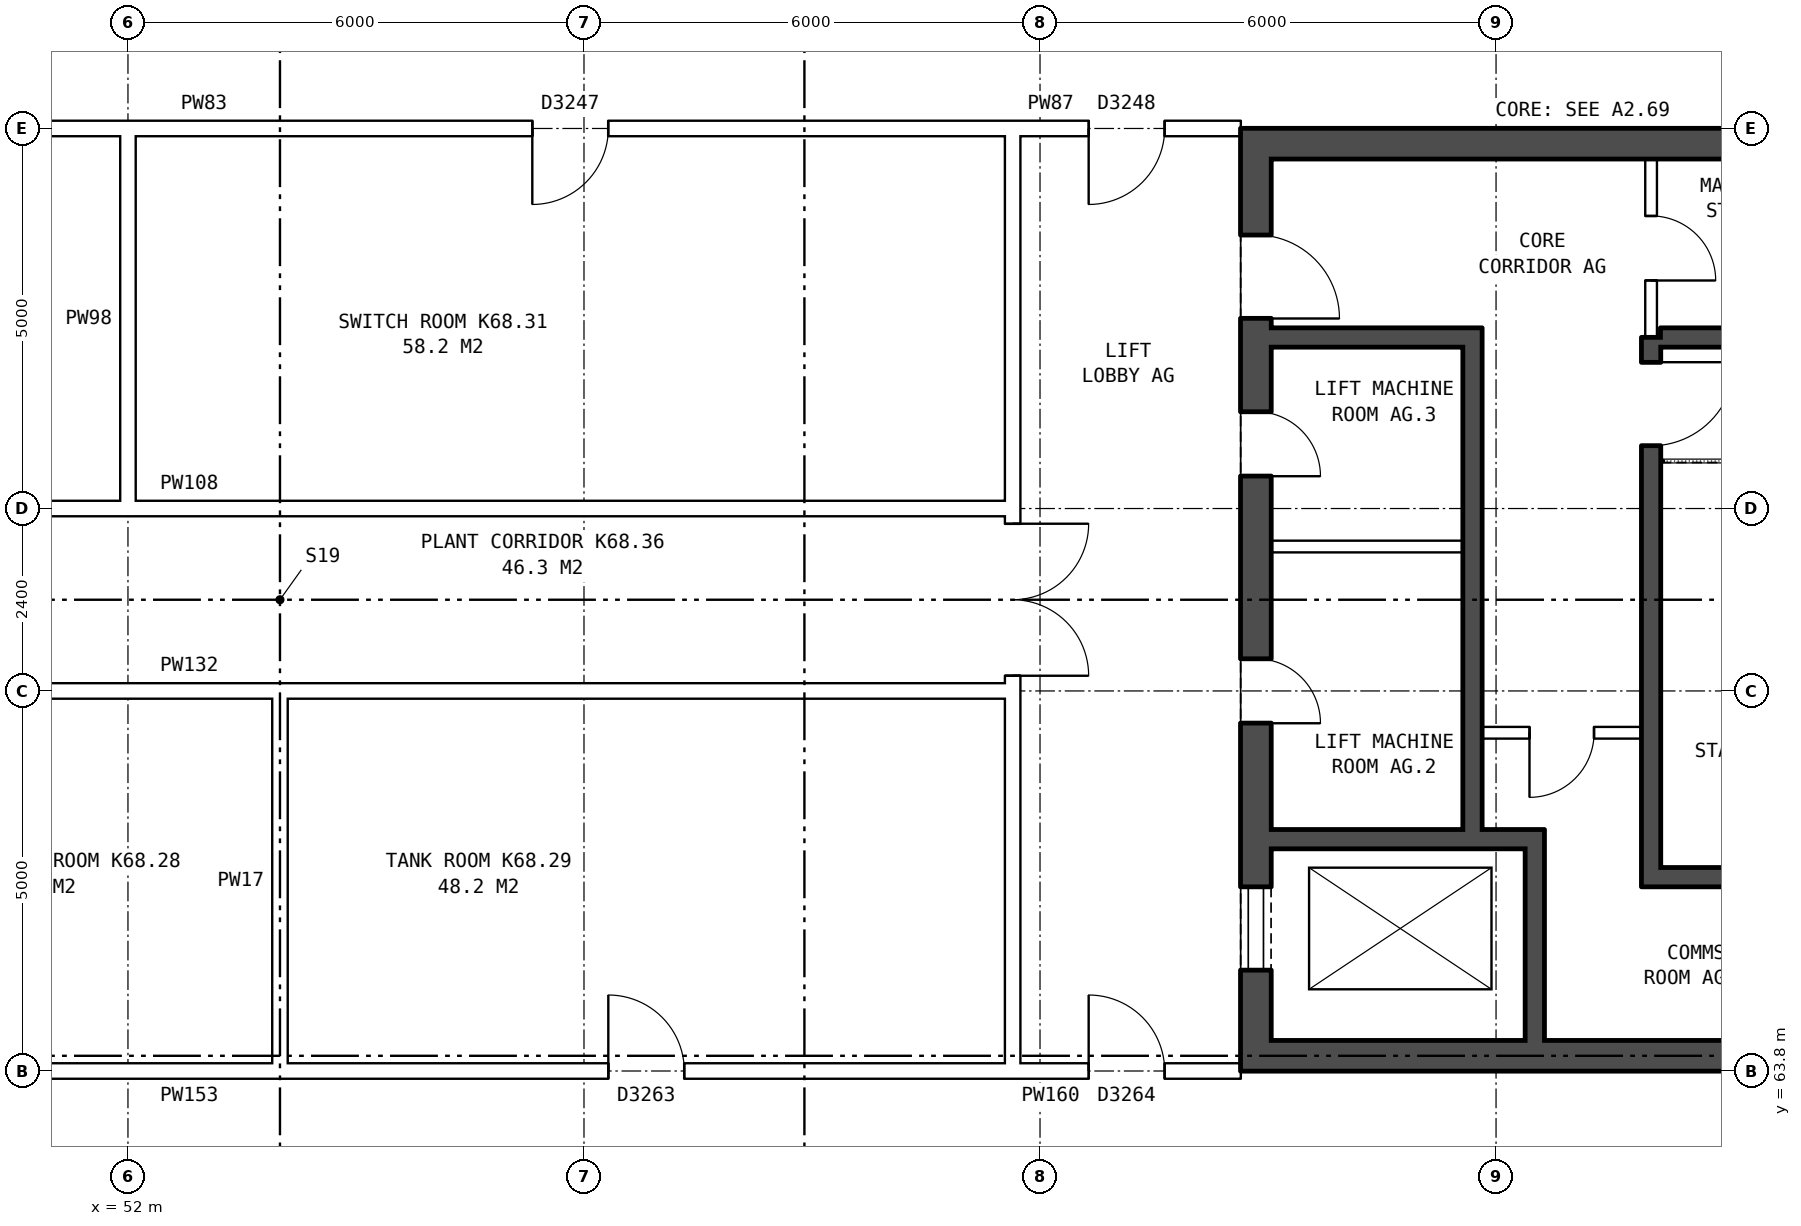
"""IFC4 building model, lengths in metres.
Left out: names, types, materials, properties, quantities, classifications, styles, units other than length and angle.
Written with IfcOpenShell. Run it as: python <this file> out.ifc"""

import sys

from ifc_helpers import new_model, si_unit, direction, frame, frame_2d, origin, place, context, subcontext, project, spatial, rectangle, extrude, element, fill, save


model = new_model("IFC4")
c1 = context("Model", 3, precision=1e-05, world=origin(), true_north=direction((0.0, 1.0)))
c2 = subcontext(c1, "Body", "Model", "MODEL_VIEW")
j1 = project(units=[si_unit("LENGTHUNIT", "METRE"), si_unit("PLANEANGLEUNIT", "RADIAN")], contexts=[c1])
p1 = place(None, origin())
s1 = spatial("IfcSite", under=j1, at=p1, CompositionType="ELEMENT")
p2 = place(p1, origin())
s2 = spatial("IfcBuilding", under=s1, at=p2, CompositionType="ELEMENT")
p3 = place(p2, frame((0.0, 0.0, 243.9)))
s3 = spatial("IfcBuildingStorey", under=s2, at=p3, CompositionType="ELEMENT", Elevation=243.9)
p4 = place(p3, frame((66.84, 63.8, 0.0), z_axis=(0.0, 0.0, 1.0), x_axis=(0.0, 1.0, 0.0)))
e1 = element("IfcWall", 1, at=p4, inside=s3, PredefinedType="SHEAR", context=c2, shape_type="SweptSolid", body=[
    extrude(rectangle(XDim=12.4, YDim=0.4, at=frame_2d((6.2, 0.0))), origin(), (0.0, 0.0, 1.0), 3.3),
])
p5 = place(p4, frame((1.325, 0.0, 0.0)))
e2 = element("IfcOpeningElement", 2, at=p5, cuts=e1, PredefinedType="OPENING", context=c2, shape_type="SweptSolid", body=[
    extrude(rectangle(XDim=1.1, YDim=2.1, at=frame_2d((0.55, 1.05))), frame((0.0, 0.21, 0.0), z_axis=(0.0, -1.0, 0.0), x_axis=(1.0, 0.0, 0.0)), (0.0, 0.0, 1.0), 0.42),
])
p6 = place(p4, frame((4.575, 0.0, 0.0)))
e3 = element("IfcOpeningElement", 3, at=p6, cuts=e1, PredefinedType="OPENING", context=c2, shape_type="SweptSolid", body=[
    extrude(rectangle(XDim=0.85, YDim=2.1, at=frame_2d((0.425, 1.05))), frame((0.0, 0.21, 0.0), z_axis=(0.0, -1.0, 0.0), x_axis=(1.0, 0.0, 0.0)), (0.0, 0.0, 1.0), 0.42),
])
p7 = place(p4, frame((7.825, 0.0, 0.0)))
e4 = element("IfcOpeningElement", 4, at=p7, cuts=e1, PredefinedType="OPENING", context=c2, shape_type="SweptSolid", body=[
    extrude(rectangle(XDim=0.85, YDim=2.1, at=frame_2d((0.425, 1.05))), frame((0.0, 0.21, 0.0), z_axis=(0.0, -1.0, 0.0), x_axis=(1.0, 0.0, 0.0)), (0.0, 0.0, 1.0), 0.42),
])
p8 = place(p4, frame((9.9, 0.0, 0.0)))
e5 = element("IfcOpeningElement", 5, at=p8, cuts=e1, PredefinedType="OPENING", context=c2, shape_type="SweptSolid", body=[
    extrude(rectangle(XDim=1.1, YDim=2.1, at=frame_2d((0.55, 1.05))), frame((0.0, 0.21, 0.0), z_axis=(0.0, -1.0, 0.0), x_axis=(1.0, 0.0, 0.0)), (0.0, 0.0, 1.0), 0.42),
])
for number, where, z_axis, x_axis in (
    (6, (67.04, 64.0, 0.0), (0.0, 0.0, 1.0), (1.0, 0.0, 0.0)),
    (7, (67.04, 76.0, 0.0), (0.0, 0.0, 1.0), (1.0, 0.0, 0.0)),
):
    element("IfcWall", number, at=place(p3, frame(where, z_axis=z_axis, x_axis=x_axis)), inside=s3, PredefinedType="SHEAR", context=c2, shape_type="SweptSolid", body=[
        extrude(rectangle(XDim=8.2, YDim=0.4, at=frame_2d((4.1, 0.0))), origin(), (0.0, 0.0, 1.0), 3.3),
    ])
p9 = place(p3, frame((72.165, 66.35, 0.0), z_axis=(0.0, 0.0, 1.0), x_axis=(1.0, 0.0, 0.0)))
e8 = element("IfcWall", 8, at=p9, inside=s3, PredefinedType="SHEAR", context=c2, shape_type="SweptSolid", body=[
    extrude(rectangle(XDim=3.075, YDim=0.25, at=frame_2d((1.538, 0.0))), origin(), (0.0, 0.0, 1.0), 3.3),
])
p10 = place(p3, frame((67.04, 66.85, 0.0), z_axis=(0.0, 0.0, 1.0), x_axis=(1.0, 0.0, 0.0)))
e9 = element("IfcWall", 9, at=p10, inside=s3, PredefinedType="SHEAR", context=c2, shape_type="SweptSolid", body=[
    extrude(rectangle(XDim=3.595, YDim=0.25, at=frame_2d((1.797, 0.0))), origin(), (0.0, 0.0, 1.0), 3.3),
])
p11 = place(p3, frame((69.815, 68.25, 0.0), z_axis=(0.0, 0.0, 1.0), x_axis=(1.0, 0.0, 0.0)))
e10 = element("IfcWall", 10, at=p11, inside=s3, PredefinedType="PARTITIONING", context=c2, shape_type="SweptSolid", body=[
    extrude(rectangle(XDim=2.1, YDim=0.15, at=frame_2d((1.05, 0.0))), origin(), (0.0, 0.0, 1.0), 3.3),
])
p12 = place(p11, frame((0.625, 0.0, 0.0)))
e11 = element("IfcOpeningElement", 11, at=p12, cuts=e10, PredefinedType="OPENING", context=c2, shape_type="SweptSolid", body=[
    extrude(rectangle(XDim=0.85, YDim=2.1, at=frame_2d((0.425, 1.05))), frame((0.0, 0.085, 0.0), z_axis=(0.0, -1.0, 0.0), x_axis=(1.0, 0.0, 0.0)), (0.0, 0.0, 1.0), 0.17),
])
p13 = place(p3, frame((67.04, 70.7, 0.0), z_axis=(0.0, 0.0, 1.0), x_axis=(1.0, 0.0, 0.0)))
e12 = element("IfcWall", 12, at=p13, inside=s3, PredefinedType="PARTITIONING", context=c2, shape_type="SweptSolid", body=[
    extrude(rectangle(XDim=2.525, YDim=0.15, at=frame_2d((1.262, 0.0))), origin(), (0.0, 0.0, 1.0), 3.3),
])
p14 = place(p3, frame((67.04, 73.45, 0.0), z_axis=(0.0, 0.0, 1.0), x_axis=(1.0, 0.0, 0.0)))
e13 = element("IfcWall", 13, at=p14, inside=s3, PredefinedType="SHEAR", context=c2, shape_type="SweptSolid", body=[
    extrude(rectangle(XDim=2.525, YDim=0.25, at=frame_2d((1.262, 0.0))), origin(), (0.0, 0.0, 1.0), 3.3),
])
p15 = place(p3, frame((72.165, 73.45, 0.0), z_axis=(0.0, 0.0, 1.0), x_axis=(1.0, 0.0, 0.0)))
e14 = element("IfcWall", 14, at=p15, inside=s3, PredefinedType="SHEAR", context=c2, shape_type="SweptSolid", body=[
    extrude(rectangle(XDim=3.075, YDim=0.25, at=frame_2d((1.538, 0.0))), origin(), (0.0, 0.0, 1.0), 3.3),
])
p16 = place(p3, frame((69.69, 66.975, 0.0), z_axis=(0.0, 0.0, 1.0), x_axis=(0.0, 1.0, 0.0)))
e15 = element("IfcWall", 15, at=p16, inside=s3, PredefinedType="SHEAR", context=c2, shape_type="SweptSolid", body=[
    extrude(rectangle(XDim=6.6, YDim=0.25, at=frame_2d((3.3, 0.0))), origin(), (0.0, 0.0, 1.0), 3.3),
])
p17 = place(p3, frame((70.51, 64.2, 0.0), z_axis=(0.0, 0.0, 1.0), x_axis=(0.0, 1.0, 0.0)))
e16 = element("IfcWall", 16, at=p17, inside=s3, PredefinedType="SHEAR", context=c2, shape_type="SweptSolid", body=[
    extrude(rectangle(XDim=2.525, YDim=0.25, at=frame_2d((1.263, 0.0))), origin(), (0.0, 0.0, 1.0), 3.3),
])
p18 = place(p3, frame((72.04, 66.225, 0.0), z_axis=(0.0, 0.0, 1.0), x_axis=(0.0, 1.0, 0.0)))
e17 = element("IfcWall", 17, at=p18, inside=s3, PredefinedType="SHEAR", context=c2, shape_type="SweptSolid", body=[
    extrude(rectangle(XDim=7.225, YDim=0.25, at=frame_2d((3.612, 0.0))), origin(), (0.0, 0.0, 1.0), 3.3),
])
p19 = place(p18, frame((5.8, 0.0, 0.0)))
e18 = element("IfcOpeningElement", 18, at=p19, cuts=e17, PredefinedType="OPENING", context=c2, shape_type="SweptSolid", body=[
    extrude(rectangle(XDim=1.1, YDim=2.1, at=frame_2d((0.55, 1.05))), frame((0.0, 0.135, 0.0), z_axis=(0.0, -1.0, 0.0), x_axis=(1.0, 0.0, 0.0)), (0.0, 0.0, 1.0), 0.27),
])
p20 = place(p3, frame((72.04, 73.45, 0.0), z_axis=(0.0, 0.0, 1.0), x_axis=(0.0, 1.0, 0.0)))
e19 = element("IfcWall", 19, at=p20, inside=s3, PredefinedType="PARTITIONING", context=c2, shape_type="SweptSolid", body=[
    extrude(rectangle(XDim=2.35, YDim=0.15, at=frame_2d((1.175, 0.0))), origin(), (0.0, 0.0, 1.0), 3.3),
])
p21 = place(p20, frame((0.75, 0.0, 0.0)))
e20 = element("IfcOpeningElement", 20, at=p21, cuts=e19, PredefinedType="OPENING", context=c2, shape_type="SweptSolid", body=[
    extrude(rectangle(XDim=0.85, YDim=2.1, at=frame_2d((0.425, 1.05))), frame((0.0, 0.085, 0.0), z_axis=(0.0, -1.0, 0.0), x_axis=(1.0, 0.0, 0.0)), (0.0, 0.0, 1.0), 0.17),
])
p22 = place(p3, frame((63.64, 63.9, 0.0), z_axis=(0.0, 0.0, 1.0), x_axis=(0.0, 1.0, 0.0)))
e21 = element("IfcWall", 21, at=p22, inside=s3, PredefinedType="PARTITIONING", context=c2, shape_type="SweptSolid", body=[
    extrude(rectangle(XDim=12.2, YDim=0.2, at=frame_2d((6.1, 0.0))), origin(), (0.0, 0.0, 1.0), 3.3),
])
p23 = place(p22, frame((5.1, 0.0, 0.0)))
e22 = element("IfcOpeningElement", 22, at=p23, cuts=e21, PredefinedType="OPENING", context=c2, shape_type="SweptSolid", body=[
    extrude(rectangle(XDim=2.0, YDim=2.1, at=frame_2d((1.0, 1.05))), frame((0.0, 0.11, 0.0), z_axis=(0.0, -1.0, 0.0), x_axis=(1.0, 0.0, 0.0)), (0.0, 0.0, 1.0), 0.22),
])
p24 = place(p3, frame((44.36, 63.8, 0.0), z_axis=(0.0, 0.0, 1.0), x_axis=(1.0, 0.0, 0.0)))
e23 = element("IfcWall", 23, at=p24, inside=s3, PredefinedType="PARTITIONING", context=c2, shape_type="SweptSolid", body=[
    extrude(rectangle(XDim=19.28, YDim=0.2, at=frame_2d((9.64, 0.0))), origin(), (0.0, 0.0, 1.0), 3.3),
])
p25 = place(p24, frame((4.32, 0.0, 0.0)))
e24 = element("IfcOpeningElement", 24, at=p25, cuts=e23, PredefinedType="OPENING", context=c2, shape_type="SweptSolid", body=[
    extrude(rectangle(XDim=1.0, YDim=2.1, at=frame_2d((0.5, 1.05))), frame((0.0, 0.11, 0.0), z_axis=(0.0, -1.0, 0.0), x_axis=(1.0, 0.0, 0.0)), (0.0, 0.0, 1.0), 0.22),
])
p26 = place(p24, frame((13.96, 0.0, 0.0)))
e25 = element("IfcOpeningElement", 25, at=p26, cuts=e23, PredefinedType="OPENING", context=c2, shape_type="SweptSolid", body=[
    extrude(rectangle(XDim=1.0, YDim=2.1, at=frame_2d((0.5, 1.05))), frame((0.0, 0.11, 0.0), z_axis=(0.0, -1.0, 0.0), x_axis=(1.0, 0.0, 0.0)), (0.0, 0.0, 1.0), 0.22),
])
p27 = place(p3, frame((63.64, 63.8, 0.0), z_axis=(0.0, 0.0, 1.0), x_axis=(1.0, 0.0, 0.0)))
e26 = element("IfcWall", 26, at=p27, inside=s3, PredefinedType="PARTITIONING", context=c2, shape_type="SweptSolid", body=[
    extrude(rectangle(XDim=3.0, YDim=0.2, at=frame_2d((1.5, 0.0))), origin(), (0.0, 0.0, 1.0), 3.3),
])
p28 = place(p27, frame((1.0, 0.0, 0.0)))
e27 = element("IfcOpeningElement", 27, at=p28, cuts=e26, PredefinedType="OPENING", context=c2, shape_type="SweptSolid", body=[
    extrude(rectangle(XDim=1.0, YDim=2.1, at=frame_2d((0.5, 1.05))), frame((0.0, 0.11, 0.0), z_axis=(0.0, -1.0, 0.0), x_axis=(1.0, 0.0, 0.0)), (0.0, 0.0, 1.0), 0.22),
])
for number, where, z_axis, x_axis in (
    (28, (44.36, 68.8, 0.0), (0.0, 0.0, 1.0), (1.0, 0.0, 0.0)),
    (29, (44.36, 71.2, 0.0), (0.0, 0.0, 1.0), (1.0, 0.0, 0.0)),
):
    element("IfcWall", number, at=place(p3, frame(where, z_axis=z_axis, x_axis=x_axis)), inside=s3, PredefinedType="PARTITIONING", context=c2, shape_type="SweptSolid", body=[
        extrude(rectangle(XDim=19.28, YDim=0.2, at=frame_2d((9.64, 0.0))), origin(), (0.0, 0.0, 1.0), 3.3),
    ])
p29 = place(p3, frame((44.36, 76.2, 0.0), z_axis=(0.0, 0.0, 1.0), x_axis=(1.0, 0.0, 0.0)))
e30 = element("IfcWall", 30, at=p29, inside=s3, PredefinedType="PARTITIONING", context=c2, shape_type="SweptSolid", body=[
    extrude(rectangle(XDim=19.28, YDim=0.2, at=frame_2d((9.64, 0.0))), origin(), (0.0, 0.0, 1.0), 3.3),
])
p30 = place(p29, frame((3.32, 0.0, 0.0)))
e31 = element("IfcOpeningElement", 31, at=p30, cuts=e30, PredefinedType="OPENING", context=c2, shape_type="SweptSolid", body=[
    extrude(rectangle(XDim=1.0, YDim=2.1, at=frame_2d((0.5, 1.05))), frame((0.0, 0.11, 0.0), z_axis=(0.0, -1.0, 0.0), x_axis=(1.0, 0.0, 0.0)), (0.0, 0.0, 1.0), 0.22),
])
p31 = place(p29, frame((12.96, 0.0, 0.0)))
e32 = element("IfcOpeningElement", 32, at=p31, cuts=e30, PredefinedType="OPENING", context=c2, shape_type="SweptSolid", body=[
    extrude(rectangle(XDim=1.0, YDim=2.1, at=frame_2d((0.5, 1.05))), frame((0.0, 0.11, 0.0), z_axis=(0.0, -1.0, 0.0), x_axis=(1.0, 0.0, 0.0)), (0.0, 0.0, 1.0), 0.22),
])
p32 = place(p3, frame((63.64, 76.2, 0.0), z_axis=(0.0, 0.0, 1.0), x_axis=(1.0, 0.0, 0.0)))
e33 = element("IfcWall", 33, at=p32, inside=s3, PredefinedType="PARTITIONING", context=c2, shape_type="SweptSolid", body=[
    extrude(rectangle(XDim=3.0, YDim=0.2, at=frame_2d((1.5, 0.0))), origin(), (0.0, 0.0, 1.0), 3.3),
])
p33 = place(p32, frame((1.0, 0.0, 0.0)))
e34 = element("IfcOpeningElement", 34, at=p33, cuts=e33, PredefinedType="OPENING", context=c2, shape_type="SweptSolid", body=[
    extrude(rectangle(XDim=1.0, YDim=2.1, at=frame_2d((0.5, 1.05))), frame((0.0, 0.11, 0.0), z_axis=(0.0, -1.0, 0.0), x_axis=(1.0, 0.0, 0.0)), (0.0, 0.0, 1.0), 0.22),
])
for number, where, z_axis, x_axis in (
    (35, (52.0, 71.1, 0.0), (0.0, 0.0, 1.0), (0.0, 1.0, 0.0)),
    (36, (54.0, 63.7, 0.0), (0.0, 0.0, 1.0), (0.0, 1.0, 0.0)),
):
    element("IfcWall", number, at=place(p3, frame(where, z_axis=z_axis, x_axis=x_axis)), inside=s3, PredefinedType="PARTITIONING", context=c2, shape_type="SweptSolid", body=[
        extrude(rectangle(XDim=5.2, YDim=0.2, at=frame_2d((2.6, 0.0))), origin(), (0.0, 0.0, 1.0), 3.3),
    ])
p34 = place(p5, origin())
e37 = element("IfcDoor", 37, at=p34, inside=s3, OperationType="DOUBLE_DOOR_SLIDING", PredefinedType="DOOR", context=c2, shape_type="SweptSolid", body=[
    extrude(rectangle(XDim=1.1, YDim=2.1, at=frame_2d((0.55, 1.05))), frame((0.0, -0.135, 0.0), z_axis=(0.0, -1.0, 0.0), x_axis=(1.0, 0.0, 0.0)), (0.0, 0.0, 1.0), 0.05),
])
fill(e2, e37)
p35 = place(p6, frame((0.85, 0.0, 0.0), z_axis=(0.0, 0.0, 1.0), x_axis=(-1.0, 0.0, 0.0)))
e38 = element("IfcDoor", 38, at=p35, inside=s3, OperationType="SINGLE_SWING_RIGHT", PredefinedType="DOOR", context=c2, shape_type="SweptSolid", body=[
    extrude(rectangle(XDim=0.85, YDim=2.1, at=frame_2d((0.425, 1.05))), frame((0.0, 0.185, 0.0), z_axis=(0.0, -1.0, 0.0), x_axis=(1.0, 0.0, 0.0)), (0.0, 0.0, 1.0), 0.05),
])
fill(e3, e38)
p36 = place(p7, frame((0.85, 0.0, 0.0), z_axis=(0.0, 0.0, 1.0), x_axis=(-1.0, 0.0, 0.0)))
e39 = element("IfcDoor", 39, at=p36, inside=s3, OperationType="SINGLE_SWING_RIGHT", PredefinedType="DOOR", context=c2, shape_type="SweptSolid", body=[
    extrude(rectangle(XDim=0.85, YDim=2.1, at=frame_2d((0.425, 1.05))), frame((0.0, 0.185, 0.0), z_axis=(0.0, -1.0, 0.0), x_axis=(1.0, 0.0, 0.0)), (0.0, 0.0, 1.0), 0.05),
])
fill(e4, e39)
p37 = place(p8, frame((1.1, 0.0, 0.0), z_axis=(0.0, 0.0, 1.0), x_axis=(-1.0, 0.0, 0.0)))
e40 = element("IfcDoor", 40, at=p37, inside=s3, OperationType="SINGLE_SWING_RIGHT", PredefinedType="DOOR", context=c2, shape_type="SweptSolid", body=[
    extrude(rectangle(XDim=1.1, YDim=2.1, at=frame_2d((0.55, 1.05))), frame((0.0, 0.185, 0.0), z_axis=(0.0, -1.0, 0.0), x_axis=(1.0, 0.0, 0.0)), (0.0, 0.0, 1.0), 0.05),
])
fill(e5, e40)
p38 = place(p19, frame((1.1, 0.0, 0.0), z_axis=(0.0, 0.0, 1.0), x_axis=(-1.0, 0.0, 0.0)))
e41 = element("IfcDoor", 41, at=p38, inside=s3, OperationType="SINGLE_SWING_LEFT", PredefinedType="DOOR", context=c2, shape_type="SweptSolid", body=[
    extrude(rectangle(XDim=1.1, YDim=2.1, at=frame_2d((0.55, 1.05))), frame((0.0, 0.025, 0.0), z_axis=(0.0, -1.0, 0.0), x_axis=(1.0, 0.0, 0.0)), (0.0, 0.0, 1.0), 0.05),
])
fill(e18, e41)
p39 = place(p12, frame((0.85, 0.0, 0.0), z_axis=(0.0, 0.0, 1.0), x_axis=(-1.0, 0.0, 0.0)))
e42 = element("IfcDoor", 42, at=p39, inside=s3, OperationType="SINGLE_SWING_RIGHT", PredefinedType="DOOR", context=c2, shape_type="SweptSolid", body=[
    extrude(rectangle(XDim=0.85, YDim=2.1, at=frame_2d((0.425, 1.05))), frame((0.0, 0.025, 0.0), z_axis=(0.0, -1.0, 0.0), x_axis=(1.0, 0.0, 0.0)), (0.0, 0.0, 1.0), 0.05),
])
fill(e11, e42)
p40 = place(p21, frame((0.85, 0.0, 0.0), z_axis=(0.0, 0.0, 1.0), x_axis=(-1.0, 0.0, 0.0)))
e43 = element("IfcDoor", 43, at=p40, inside=s3, OperationType="SINGLE_SWING_RIGHT", PredefinedType="DOOR", context=c2, shape_type="SweptSolid", body=[
    extrude(rectangle(XDim=0.85, YDim=2.1, at=frame_2d((0.425, 1.05))), frame((0.0, 0.025, 0.0), z_axis=(0.0, -1.0, 0.0), x_axis=(1.0, 0.0, 0.0)), (0.0, 0.0, 1.0), 0.05),
])
fill(e20, e43)
p41 = place(p23, frame((2.0, 0.0, 0.0), z_axis=(0.0, 0.0, 1.0), x_axis=(-1.0, 0.0, 0.0)))
e44 = element("IfcDoor", 44, at=p41, inside=s3, OperationType="DOUBLE_DOOR_SINGLE_SWING", PredefinedType="DOOR", context=c2, shape_type="SweptSolid", body=[
    extrude(rectangle(XDim=2.0, YDim=2.1, at=frame_2d((1.0, 1.05))), frame((0.0, 0.025, 0.0), z_axis=(0.0, -1.0, 0.0), x_axis=(1.0, 0.0, 0.0)), (0.0, 0.0, 1.0), 0.05),
])
fill(e22, e44)
p42 = place(p26, origin())
e45 = element("IfcDoor", 45, at=p42, inside=s3, OperationType="SINGLE_SWING_LEFT", PredefinedType="DOOR", context=c2, shape_type="SweptSolid", body=[
    extrude(rectangle(XDim=1.0, YDim=2.1, at=frame_2d((0.5, 1.05))), frame((0.0, 0.025, 0.0), z_axis=(0.0, -1.0, 0.0), x_axis=(1.0, 0.0, 0.0)), (0.0, 0.0, 1.0), 0.05),
])
fill(e25, e45)
p43 = place(p28, origin())
e46 = element("IfcDoor", 46, at=p43, inside=s3, OperationType="SINGLE_SWING_LEFT", PredefinedType="DOOR", context=c2, shape_type="SweptSolid", body=[
    extrude(rectangle(XDim=1.0, YDim=2.1, at=frame_2d((0.5, 1.05))), frame((0.0, 0.025, 0.0), z_axis=(0.0, -1.0, 0.0), x_axis=(1.0, 0.0, 0.0)), (0.0, 0.0, 1.0), 0.05),
])
fill(e27, e46)
p44 = place(p31, frame((1.0, 0.0, 0.0), z_axis=(0.0, 0.0, 1.0), x_axis=(-1.0, 0.0, 0.0)))
e47 = element("IfcDoor", 47, at=p44, inside=s3, OperationType="SINGLE_SWING_RIGHT", PredefinedType="DOOR", context=c2, shape_type="SweptSolid", body=[
    extrude(rectangle(XDim=1.0, YDim=2.1, at=frame_2d((0.5, 1.05))), frame((0.0, 0.025, 0.0), z_axis=(0.0, -1.0, 0.0), x_axis=(1.0, 0.0, 0.0)), (0.0, 0.0, 1.0), 0.05),
])
fill(e32, e47)
p45 = place(p33, frame((1.0, 0.0, 0.0), z_axis=(0.0, 0.0, 1.0), x_axis=(-1.0, 0.0, 0.0)))
e48 = element("IfcDoor", 48, at=p45, inside=s3, OperationType="SINGLE_SWING_RIGHT", PredefinedType="DOOR", context=c2, shape_type="SweptSolid", body=[
    extrude(rectangle(XDim=1.0, YDim=2.1, at=frame_2d((0.5, 1.05))), frame((0.0, 0.025, 0.0), z_axis=(0.0, -1.0, 0.0), x_axis=(1.0, 0.0, 0.0)), (0.0, 0.0, 1.0), 0.05),
])
fill(e34, e48)
save(model, sys.argv[1])
